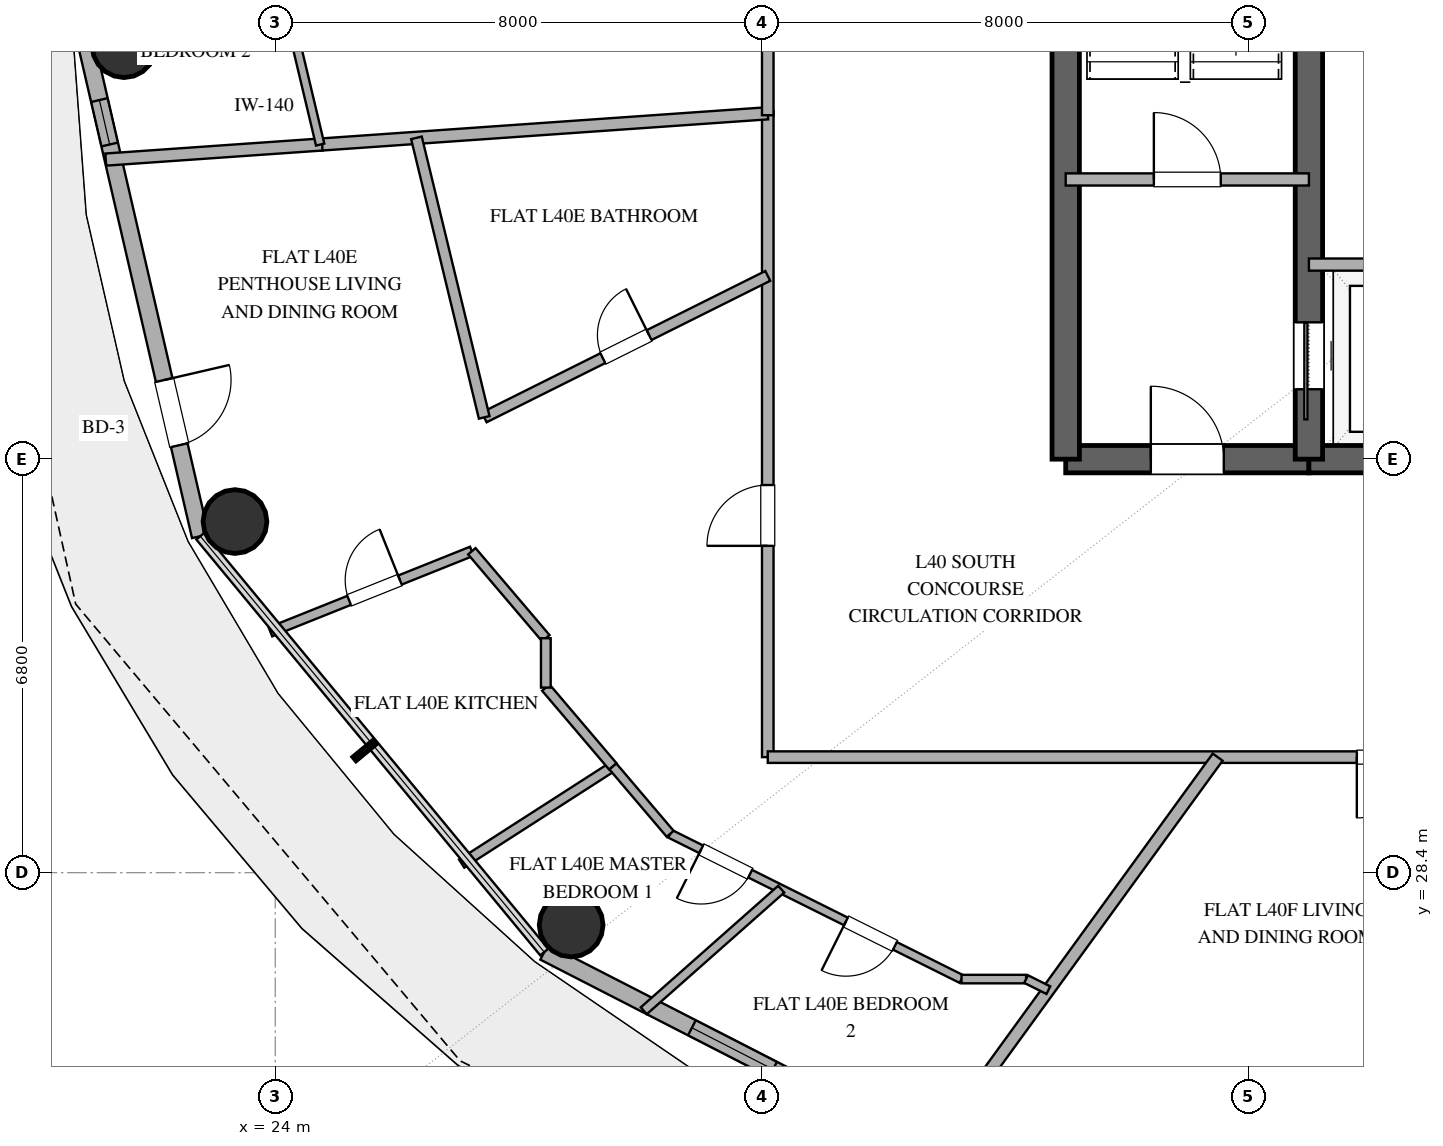
"""IFC4 building model, lengths in metres.
Left out: names, types, materials, properties, quantities, classifications, styles, units other than length and angle.
Written with IfcOpenShell. Run it as: python <this file> out.ifc"""

import sys

from ifc_helpers import new_model, si_unit, direction, frame, frame_2d, origin, origin_2d, place, context, subcontext, project, spatial, rectangle, hollow_circle, extrude, element, fill, save


model = new_model("IFC4")
c1 = context("Model", 3, precision=1e-05, world=origin(), true_north=direction((0.0, 1.0)))
c2 = subcontext(c1, "Body", "Model", "MODEL_VIEW")
j1 = project(units=[si_unit("LENGTHUNIT", "METRE"), si_unit("PLANEANGLEUNIT", "RADIAN")], contexts=[c1])
p1 = place(None, origin())
s1 = spatial("IfcSite", under=j1, at=p1, CompositionType="ELEMENT")
p2 = place(p1, origin())
s2 = spatial("IfcBuilding", under=s1, at=p2, CompositionType="ELEMENT")
p3 = place(p2, frame((0.0, 0.0, 161.4)))
s3 = spatial("IfcBuildingStorey", under=s2, at=p3, CompositionType="ELEMENT", Elevation=161.4)
p4 = place(p3, frame((37.0, 35.2, 0.0), z_axis=(0.0, 0.0, 1.0), x_axis=(1.0, 0.0, 0.0)))
e1 = element("IfcWall", 1, at=p4, inside=s3, PredefinedType="SHEAR", context=c2, shape_type="SweptSolid", body=[
    extrude(rectangle(XDim=4.0, YDim=0.45, at=frame_2d((2.0, 0.0))), origin(), (0.0, 0.0, 1.0), 3.38),
])
p5 = place(p4, frame((1.4, 0.0, 0.0)))
e2 = element("IfcOpeningElement", 2, at=p5, cuts=e1, PredefinedType="OPENING", context=c2, shape_type="SweptSolid", body=[
    extrude(rectangle(XDim=1.2, YDim=2.15, at=frame_2d((0.6, 1.075))), frame((0.0, 0.235, 0.0), z_axis=(0.0, -1.0, 0.0), x_axis=(1.0, 0.0, 0.0)), (0.0, 0.0, 1.0), 0.47),
])
p6 = place(p3, frame((41.0, 35.2, 0.0), z_axis=(0.0, 0.0, 1.0), x_axis=(1.0, 0.0, 0.0)))
e3 = element("IfcWall", 3, at=p6, inside=s3, PredefinedType="SHEAR", context=c2, shape_type="SweptSolid", body=[
    extrude(rectangle(XDim=14.0, YDim=0.45, at=frame_2d((7.0, 0.0))), origin(), (0.0, 0.0, 1.0), 3.38),
])
p7 = place(p6, frame((6.1, 0.0, 0.0)))
e4 = element("IfcOpeningElement", 4, at=p7, cuts=e3, PredefinedType="OPENING", context=c2, shape_type="SweptSolid", body=[
    extrude(rectangle(XDim=1.8, YDim=2.25, at=frame_2d((0.9, 1.125))), frame((0.0, 0.235, 0.0), z_axis=(0.0, -1.0, 0.0), x_axis=(1.0, 0.0, 0.0)), (0.0, 0.0, 1.0), 0.47),
])
p8 = place(p3, frame((37.0, 35.2, 0.0), z_axis=(0.0, 0.0, 1.0), x_axis=(0.0, 1.0, 0.0)))
e5 = element("IfcWall", 5, at=p8, inside=s3, PredefinedType="SHEAR", context=c2, shape_type="SweptSolid", body=[
    extrude(rectangle(XDim=13.6, YDim=0.45, at=frame_2d((6.8, 0.0))), origin(), (0.0, 0.0, 1.0), 3.38),
])
p9 = place(p3, frame((41.0, 35.2, 0.0), z_axis=(0.0, 0.0, 1.0), x_axis=(0.0, 1.0, 0.0)))
e6 = element("IfcWall", 6, at=p9, inside=s3, PredefinedType="SHEAR", context=c2, shape_type="SweptSolid", body=[
    extrude(rectangle(XDim=13.6, YDim=0.45, at=frame_2d((6.8, 0.0))), origin(), (0.0, 0.0, 1.0), 3.38),
])
p10 = place(p9, frame((1.15, 0.0, 0.0)))
e7 = element("IfcOpeningElement", 7, at=p10, cuts=e6, PredefinedType="OPENING", context=c2, shape_type="SweptSolid", body=[
    extrude(rectangle(XDim=1.1, YDim=2.2, at=frame_2d((0.55, 1.1))), frame((0.0, 0.235, 0.0), z_axis=(0.0, -1.0, 0.0), x_axis=(1.0, 0.0, 0.0)), (0.0, 0.0, 1.0), 0.47),
])
for number, where, z_axis, x_axis in (
    (8, (21.513, 42.0, 0.0), (0.0, 0.0, 1.0), (1.0, 0.0, 0.0)),
    (9, (23.338, 34.174, 0.0), (0.0, 0.0, 1.0), (1.0, 0.0, 0.0)),
    (10, (28.866, 27.54, 0.0), (0.0, 0.0, 1.0), (1.0, 0.0, 0.0)),
):
    element("IfcColumn", number, at=place(p3, frame(where, z_axis=z_axis, x_axis=x_axis)), inside=s3, PredefinedType="COLUMN", context=c2, shape_type="SweptSolid", body=[
        extrude(hollow_circle(Radius=0.525, WallThickness=0.028, at=origin_2d()), origin(), (0.0, 0.0, 1.0), 3.38),
    ])
p11 = place(p3, frame((20.901, 42.0, 0.0), z_axis=(0.0, 0.0, 1.0), x_axis=(0.225473184558, -0.974249374157, 0.0)))
e11 = element("IfcWall", 11, at=p11, inside=s3, PredefinedType="SOLIDWALL", context=c2, shape_type="SweptSolid", body=[
    extrude(rectangle(XDim=8.28, YDim=0.28, at=frame_2d((4.14, 0.0))), origin(), (0.0, 0.0, 1.0), 3.38),
])
p12 = place(p11, frame((5.644, 0.0, 0.0)))
e12 = element("IfcOpeningElement", 12, at=p12, cuts=e11, PredefinedType="OPENING", context=c2, shape_type="SweptSolid", body=[
    extrude(rectangle(XDim=1.1, YDim=2.25, at=frame_2d((0.55, 1.125))), frame((0.0, 0.15, 0.0), z_axis=(0.0, -1.0, 0.0), x_axis=(1.0, 0.0, 0.0)), (0.0, 0.0, 1.0), 0.3),
])
p13 = place(p11, frame((0.918, 0.0, 0.85)))
e13 = element("IfcOpeningElement", 13, at=p13, cuts=e11, PredefinedType="OPENING", context=c2, shape_type="SweptSolid", body=[
    extrude(rectangle(XDim=0.75, YDim=1.8, at=frame_2d((0.375, 0.9))), frame((0.0, 0.15, 0.0), z_axis=(0.0, -1.0, 0.0), x_axis=(1.0, 0.0, 0.0)), (0.0, 0.0, 1.0), 0.3),
])
p14 = place(p3, frame((28.424, 27.094, 0.0), z_axis=(0.0, 0.0, 1.0), x_axis=(0.889872523182, -0.456209263919, 0.0)))
e14 = element("IfcWall", 14, at=p14, inside=s3, PredefinedType="SOLIDWALL", context=c2, shape_type="SweptSolid", body=[
    extrude(rectangle(XDim=10.016, YDim=0.28, at=frame_2d((5.008, 0.0))), origin(), (0.0, 0.0, 1.0), 3.38),
])
p15 = place(p14, frame((2.729, 0.0, 0.85)))
e15 = element("IfcOpeningElement", 15, at=p15, cuts=e14, PredefinedType="OPENING", context=c2, shape_type="SweptSolid", body=[
    extrude(rectangle(XDim=1.5, YDim=2.0, at=frame_2d((0.75, 1.0))), frame((0.0, 0.15, 0.0), z_axis=(0.0, -1.0, 0.0), x_axis=(1.0, 0.0, 0.0)), (0.0, 0.0, 1.0), 0.3),
])
p16 = place(p14, frame((4.811, 0.0, 0.85)))
e16 = element("IfcOpeningElement", 16, at=p16, cuts=e14, PredefinedType="OPENING", context=c2, shape_type="SweptSolid", body=[
    extrude(rectangle(XDim=1.5, YDim=2.0, at=frame_2d((0.75, 1.0))), frame((0.0, 0.15, 0.0), z_axis=(0.0, -1.0, 0.0), x_axis=(1.0, 0.0, 0.0)), (0.0, 0.0, 1.0), 0.3),
])
p17 = place(p14, frame((7.479, 0.0, 0.85)))
e17 = element("IfcOpeningElement", 17, at=p17, cuts=e14, PredefinedType="OPENING", context=c2, shape_type="SweptSolid", body=[
    extrude(rectangle(XDim=1.0, YDim=1.8, at=frame_2d((0.5, 0.9))), frame((0.0, 0.15, 0.0), z_axis=(0.0, -1.0, 0.0), x_axis=(1.0, 0.0, 0.0)), (0.0, 0.0, 1.0), 0.3),
])
p18 = place(p3, frame((37.0, 39.8, 0.0), z_axis=(0.0, 0.0, 1.0), x_axis=(1.0, 0.0, 0.0)))
e18 = element("IfcWall", 18, at=p18, inside=s3, PredefinedType="SOLIDWALL", context=c2, shape_type="SweptSolid", body=[
    extrude(rectangle(XDim=4.0, YDim=0.2, at=frame_2d((2.0, 0.0))), origin(), (0.0, 0.0, 1.0), 2.74),
])
p19 = place(p18, frame((1.45, 0.0, 0.0)))
e19 = element("IfcOpeningElement", 19, at=p19, cuts=e18, PredefinedType="OPENING", context=c2, shape_type="SweptSolid", body=[
    extrude(rectangle(XDim=1.1, YDim=2.15, at=frame_2d((0.55, 1.075))), frame((0.0, 0.11, 0.0), z_axis=(0.0, -1.0, 0.0), x_axis=(1.0, 0.0, 0.0)), (0.0, 0.0, 1.0), 0.22),
])
p20 = place(p3, frame((41.0, 38.4, 0.0), z_axis=(0.0, 0.0, 1.0), x_axis=(1.0, 0.0, 0.0)))
e20 = element("IfcWall", 20, at=p20, inside=s3, PredefinedType="SOLIDWALL", context=c2, shape_type="SweptSolid", body=[
    extrude(rectangle(XDim=2.95, YDim=0.2, at=frame_2d((1.475, 0.0))), origin(), (0.0, 0.0, 1.0), 2.74),
])
p21 = place(p3, frame((32.1, 30.3, 0.0), z_axis=(0.0, 0.0, 1.0), x_axis=(0.0, 1.0, 0.0)))
e21 = element("IfcWall", 21, at=p21, inside=s3, PredefinedType="PARTITIONING", context=c2, shape_type="SweptSolid", body=[
    extrude(rectangle(XDim=10.62, YDim=0.19, at=frame_2d((5.31, 0.0))), origin(), (0.0, 0.0, 1.0), 2.74),
])
p22 = place(p21, frame((3.475, 0.0, 0.0)))
e22 = element("IfcOpeningElement", 22, at=p22, cuts=e21, PredefinedType="OPENING", context=c2, shape_type="SweptSolid", body=[
    extrude(rectangle(XDim=1.0, YDim=2.2, at=frame_2d((0.5, 1.1))), frame((0.0, 0.105, 0.0), z_axis=(0.0, -1.0, 0.0), x_axis=(1.0, 0.0, 0.0)), (0.0, 0.0, 1.0), 0.21),
])
p23 = place(p3, frame((48.308, 30.3, 0.0), z_axis=(0.0, 0.0, 1.0), x_axis=(-1.0, 0.0, 0.0)))
e23 = element("IfcWall", 23, at=p23, inside=s3, PredefinedType="PARTITIONING", context=c2, shape_type="SweptSolid", body=[
    extrude(rectangle(XDim=16.208, YDim=0.19, at=frame_2d((8.104, 0.0))), origin(), (0.0, 0.0, 1.0), 2.74),
])
p24 = place(p23, frame((5.52, 0.0, 0.0)))
e24 = element("IfcOpeningElement", 24, at=p24, cuts=e23, PredefinedType="OPENING", context=c2, shape_type="SweptSolid", body=[
    extrude(rectangle(XDim=1.0, YDim=2.2, at=frame_2d((0.5, 1.1))), frame((0.0, 0.105, 0.0), z_axis=(0.0, -1.0, 0.0), x_axis=(1.0, 0.0, 0.0)), (0.0, 0.0, 1.0), 0.21),
])
p25 = place(p3, frame((32.1, 40.888, 0.0), z_axis=(0.0, 0.0, 1.0), x_axis=(-0.997562906323, -0.069772830877, 0.0)))
e25 = element("IfcWall", 25, at=p25, inside=s3, PredefinedType="PARTITIONING", context=c2, shape_type="SweptSolid", body=[
    extrude(rectangle(XDim=7.38, YDim=0.2, at=frame_2d((3.69, 0.0))), origin(), (0.0, 0.0, 1.0), 2.74),
])
p26 = place(p3, frame((32.1, 40.856, 0.0), z_axis=(0.0, 0.0, 1.0), x_axis=(0.0, 1.0, 0.0)))
e26 = element("IfcWall", 26, at=p26, inside=s3, PredefinedType="PARTITIONING", context=c2, shape_type="SweptSolid", body=[
    extrude(rectangle(XDim=12.844, YDim=0.19, at=frame_2d((6.422, 0.0))), origin(), (0.0, 0.0, 1.0), 2.74),
])
p27 = place(p3, frame((27.436, 35.887, 0.0), z_axis=(0.0, 0.0, 1.0), x_axis=(0.894857716432, 0.446351506485, 0.0)))
e27 = element("IfcWall", 27, at=p27, inside=s3, PredefinedType="PLUMBINGWALL", context=c2, shape_type="SweptSolid", body=[
    extrude(rectangle(XDim=5.212, YDim=0.18, at=frame_2d((2.606, 0.0))), origin(), (0.0, 0.0, 1.0), 2.74),
])
p28 = place(p27, frame((2.181, 0.0, 0.0)))
e28 = element("IfcOpeningElement", 28, at=p28, cuts=e27, PredefinedType="OPENING", context=c2, shape_type="SweptSolid", body=[
    extrude(rectangle(XDim=0.85, YDim=2.1, at=frame_2d((0.425, 1.05))), frame((0.0, 0.1, 0.0), z_axis=(0.0, -1.0, 0.0), x_axis=(1.0, 0.0, 0.0)), (0.0, 0.0, 1.0), 0.2),
])
p29 = place(p3, frame((34.726, 23.73, 0.0), z_axis=(0.0, 0.0, 1.0), x_axis=(0.587785528328, 0.809016793823, 0.0)))
e29 = element("IfcWall", 29, at=p29, inside=s3, PredefinedType="PARTITIONING", context=c2, shape_type="SweptSolid", body=[
    extrude(rectangle(XDim=8.121, YDim=0.2, at=frame_2d((4.061, 0.0))), origin(), (0.0, 0.0, 1.0), 2.74),
])
p30 = place(p3, frame((26.322, 40.484, 0.0), z_axis=(0.0, 0.0, 1.0), x_axis=(0.235484788327, -0.971878034769, 0.0)))
e30 = element("IfcWall", 30, at=p30, inside=s3, PredefinedType="PLUMBINGWALL", context=c2, shape_type="SweptSolid", body=[
    extrude(rectangle(XDim=4.73, YDim=0.18, at=frame_2d((2.365, 0.0))), origin(), (0.0, 0.0, 1.0), 2.74),
])
p31 = place(p3, frame((23.921, 32.36, 0.0), z_axis=(0.0, 0.0, 1.0), x_axis=(0.928353942887, 0.371697399408, 0.0)))
e31 = element("IfcWall", 31, at=p31, inside=s3, PredefinedType="PLUMBINGWALL", context=c2, shape_type="SweptSolid", body=[
    extrude(rectangle(XDim=3.568, YDim=0.16, at=frame_2d((1.784, 0.0))), origin(), (0.0, 0.0, 1.0), 2.74),
])
p32 = place(p31, frame((1.394, 0.0, 0.0)))
e32 = element("IfcOpeningElement", 32, at=p32, cuts=e31, PredefinedType="OPENING", context=c2, shape_type="SweptSolid", body=[
    extrude(rectangle(XDim=0.9, YDim=2.1, at=frame_2d((0.45, 1.05))), frame((0.0, 0.09, 0.0), z_axis=(0.0, -1.0, 0.0), x_axis=(1.0, 0.0, 0.0)), (0.0, 0.0, 1.0), 0.18),
])
p33 = place(p3, frame((21.212, 40.127, 0.0), z_axis=(0.0, 0.0, 1.0), x_axis=(0.997565256009, 0.069739228586, 0.0)))
e33 = element("IfcWall", 33, at=p33, inside=s3, PredefinedType="PARTITIONING", context=c2, shape_type="SweptSolid", body=[
    extrude(rectangle(XDim=3.567, YDim=0.2, at=frame_2d((1.784, 0.0))), origin(), (0.0, 0.0, 1.0), 2.74),
])
p34 = place(p3, frame((35.287, 26.65, 0.0), z_axis=(0.0, 0.0, 1.0), x_axis=(-0.894937323042, 0.44619187333, 0.0)))
e34 = element("IfcWall", 34, at=p34, inside=s3, PredefinedType="PARTITIONING", context=c2, shape_type="SweptSolid", body=[
    extrude(rectangle(XDim=5.354, YDim=0.14, at=frame_2d((2.677, 0.0))), origin(), (0.0, 0.0, 1.0), 2.74),
])
p35 = place(p34, frame((1.224, 0.0, 0.0)))
e35 = element("IfcOpeningElement", 35, at=p35, cuts=e34, PredefinedType="OPENING", context=c2, shape_type="SweptSolid", body=[
    extrude(rectangle(XDim=0.9, YDim=2.1, at=frame_2d((0.45, 1.05))), frame((0.0, 0.08, 0.0), z_axis=(0.0, -1.0, 0.0), x_axis=(1.0, 0.0, 0.0)), (0.0, 0.0, 1.0), 0.16),
])
p36 = place(p34, frame((3.884, 0.0, 0.0)))
e36 = element("IfcOpeningElement", 36, at=p36, cuts=e34, PredefinedType="OPENING", context=c2, shape_type="SweptSolid", body=[
    extrude(rectangle(XDim=0.9, YDim=2.1, at=frame_2d((0.45, 1.05))), frame((0.0, 0.08, 0.0), z_axis=(0.0, -1.0, 0.0), x_axis=(1.0, 0.0, 0.0)), (0.0, 0.0, 1.0), 0.16),
])
p37 = place(p3, frame((32.321, 28.128, 0.0), z_axis=(0.0, 0.0, 1.0), x_axis=(-0.748956405403, -0.6626192744, 0.0)))
e37 = element("IfcWall", 37, at=p37, inside=s3, PredefinedType="PARTITIONING", context=c2, shape_type="SweptSolid", body=[
    extrude(rectangle(XDim=3.017, YDim=0.15, at=frame_2d((1.509, 0.0))), origin(), (0.0, 0.0, 1.0), 2.74),
])
p38 = place(p3, frame((29.553, 30.146, 0.0), z_axis=(0.0, 0.0, 1.0), x_axis=(-0.841296531109, -0.540573904978, 0.0)))
e38 = element("IfcWall", 38, at=p38, inside=s3, PredefinedType="PLUMBINGWALL", context=c2, shape_type="SweptSolid", body=[
    extrude(rectangle(XDim=2.956, YDim=0.16, at=frame_2d((1.478, 0.0))), origin(), (0.0, 0.0, 1.0), 2.74),
])
p39 = place(p3, frame((27.233, 33.686, 0.0), z_axis=(0.0, 0.0, 1.0), x_axis=(0.648078524475, -0.761573519835, 0.0)))
e39 = element("IfcWall", 39, at=p39, inside=s3, PredefinedType="PLUMBINGWALL", context=c2, shape_type="SweptSolid", body=[
    extrude(rectangle(XDim=1.878, YDim=0.16, at=frame_2d((0.939, 0.0))), origin(), (0.0, 0.0, 1.0), 2.74),
])
p40 = place(p3, frame((28.45, 31.443, 0.0), z_axis=(0.0, 0.0, 1.0), x_axis=(0.64788149294, -0.761741144422, 0.0)))
e40 = element("IfcWall", 40, at=p40, inside=s3, PredefinedType="PLUMBINGWALL", context=c2, shape_type="SweptSolid", body=[
    extrude(rectangle(XDim=1.702, YDim=0.16, at=frame_2d((0.851, 0.0))), origin(), (0.0, 0.0, 1.0), 2.74),
])
p41 = place(p3, frame((24.739, 40.373, 0.0), z_axis=(0.0, 0.0, 1.0), x_axis=(-0.231561310927, 0.972820311919, 0.0)))
e41 = element("IfcWall", 41, at=p41, inside=s3, PredefinedType="PARTITIONING", context=c2, shape_type="SweptSolid", body=[
    extrude(rectangle(XDim=1.672, YDim=0.14, at=frame_2d((0.836, 0.0))), origin(), (0.0, 0.0, 1.0), 2.74),
])
p42 = place(p3, frame((29.553, 30.146, 0.0), z_axis=(0.0, 0.0, 1.0), x_axis=(0.647896934681, -0.761728010533, 0.0)))
e42 = element("IfcWall", 42, at=p42, inside=s3, PredefinedType="PARTITIONING", context=c2, shape_type="SweptSolid", body=[
    extrude(rectangle(XDim=1.454, YDim=0.15, at=frame_2d((0.727, 0.0))), origin(), (0.0, 0.0, 1.0), 2.74),
])
p43 = place(p3, frame((36.349, 26.65, 0.0), z_axis=(0.0, 0.0, 1.0), x_axis=(-1.0, 0.0, 0.0)))
e43 = element("IfcWall", 43, at=p43, inside=s3, PredefinedType="PARTITIONING", context=c2, shape_type="SweptSolid", body=[
    extrude(rectangle(XDim=1.062, YDim=0.14, at=frame_2d((0.531, 0.0))), origin(), (0.0, 0.0, 1.0), 2.74),
])
p44 = place(p3, frame((28.45, 32.256, 0.0), z_axis=(0.0, 0.0, 1.0), x_axis=(0.0, -1.0, 0.0)))
e44 = element("IfcWall", 44, at=p44, inside=s3, PredefinedType="PLUMBINGWALL", context=c2, shape_type="SweptSolid", body=[
    extrude(rectangle(XDim=0.812, YDim=0.16, at=frame_2d((0.406, 0.0))), origin(), (0.0, 0.0, 1.0), 2.74),
])
p45 = place(p3, frame((36.715, 26.468, 0.0), z_axis=(0.0, 0.0, 1.0), x_axis=(-0.895142158028, 0.445780794698, 0.0)))
e45 = element("IfcWall", 45, at=p45, inside=s3, PredefinedType="PARTITIONING", context=c2, shape_type="SweptSolid", body=[
    extrude(rectangle(XDim=0.409, YDim=0.14, at=frame_2d((0.205, 0.0))), origin(), (0.0, 0.0, 1.0), 2.74),
])
p46 = place(p12, origin())
e46 = element("IfcDoor", 46, at=p46, inside=s3, OperationType="SINGLE_SWING_LEFT", PredefinedType="DOOR", context=c2, shape_type="SweptSolid", body=[
    extrude(rectangle(XDim=1.1, YDim=2.25, at=frame_2d((0.55, 1.125))), frame((0.0, 0.025, 0.0), z_axis=(0.0, -1.0, 0.0), x_axis=(1.0, 0.0, 0.0)), (0.0, 0.0, 1.0), 0.05),
])
fill(e12, e46)
p47 = place(p15, origin())
e47 = element("IfcWindow", 47, at=p47, inside=s3, PartitioningType="SINGLE_PANEL", PredefinedType="WINDOW", context=c2, shape_type="SweptSolid", body=[
    extrude(rectangle(XDim=1.5, YDim=2.0, at=frame_2d((0.75, 1.0))), frame((0.0, 0.03, 0.0), z_axis=(0.0, -1.0, 0.0), x_axis=(1.0, 0.0, 0.0)), (0.0, 0.0, 1.0), 0.06),
])
fill(e15, e47)
p48 = place(p13, origin())
e48 = element("IfcWindow", 48, at=p48, inside=s3, PartitioningType="SINGLE_PANEL", PredefinedType="WINDOW", context=c2, shape_type="SweptSolid", body=[
    extrude(rectangle(XDim=0.75, YDim=1.8, at=frame_2d((0.375, 0.9))), frame((0.0, 0.03, 0.0), z_axis=(0.0, -1.0, 0.0), x_axis=(1.0, 0.0, 0.0)), (0.0, 0.0, 1.0), 0.06),
])
fill(e13, e48)
p49 = place(p10, origin())
e49 = element("IfcDoor", 49, at=p49, inside=s3, OperationType="SLIDING_TO_LEFT", PredefinedType="DOOR", context=c2, shape_type="SweptSolid", body=[
    extrude(rectangle(XDim=1.1, YDim=2.2, at=frame_2d((0.55, 1.1))), frame((0.0, 0.025, 0.0), z_axis=(0.0, -1.0, 0.0), x_axis=(1.0, 0.0, 0.0)), (0.0, 0.0, 1.0), 0.05),
])
fill(e7, e49)
p50 = place(p5, origin())
e50 = element("IfcDoor", 50, at=p50, inside=s3, OperationType="SINGLE_SWING_LEFT", PredefinedType="DOOR", context=c2, shape_type="SweptSolid", body=[
    extrude(rectangle(XDim=1.2, YDim=2.15, at=frame_2d((0.6, 1.075))), frame((0.0, 0.025, 0.0), z_axis=(0.0, -1.0, 0.0), x_axis=(1.0, 0.0, 0.0)), (0.0, 0.0, 1.0), 0.05),
])
fill(e2, e50)
p51 = place(p19, origin())
e51 = element("IfcDoor", 51, at=p51, inside=s3, OperationType="SINGLE_SWING_LEFT", PredefinedType="DOOR", context=c2, shape_type="SweptSolid", body=[
    extrude(rectangle(XDim=1.1, YDim=2.15, at=frame_2d((0.55, 1.075))), frame((0.0, 0.025, 0.0), z_axis=(0.0, -1.0, 0.0), x_axis=(1.0, 0.0, 0.0)), (0.0, 0.0, 1.0), 0.05),
])
fill(e19, e51)
p52 = place(p22, origin())
e52 = element("IfcDoor", 52, at=p52, inside=s3, OperationType="SINGLE_SWING_LEFT", PredefinedType="DOOR", context=c2, shape_type="SweptSolid", body=[
    extrude(rectangle(XDim=1.0, YDim=2.2, at=frame_2d((0.5, 1.1))), frame((0.0, 0.025, 0.0), z_axis=(0.0, -1.0, 0.0), x_axis=(1.0, 0.0, 0.0)), (0.0, 0.0, 1.0), 0.05),
])
fill(e22, e52)
p53 = place(p24, origin())
e53 = element("IfcDoor", 53, at=p53, inside=s3, OperationType="SINGLE_SWING_RIGHT", PredefinedType="DOOR", context=c2, shape_type="SweptSolid", body=[
    extrude(rectangle(XDim=1.0, YDim=2.2, at=frame_2d((0.5, 1.1))), frame((0.0, 0.025, 0.0), z_axis=(0.0, -1.0, 0.0), x_axis=(1.0, 0.0, 0.0)), (0.0, 0.0, 1.0), 0.05),
])
fill(e24, e53)
p54 = place(p28, origin())
e54 = element("IfcDoor", 54, at=p54, inside=s3, OperationType="SINGLE_SWING_RIGHT", PredefinedType="DOOR", context=c2, shape_type="SweptSolid", body=[
    extrude(rectangle(XDim=0.85, YDim=2.1, at=frame_2d((0.425, 1.05))), frame((0.0, 0.025, 0.0), z_axis=(0.0, -1.0, 0.0), x_axis=(1.0, 0.0, 0.0)), (0.0, 0.0, 1.0), 0.05),
])
fill(e28, e54)
p55 = place(p32, origin())
e55 = element("IfcDoor", 55, at=p55, inside=s3, OperationType="SINGLE_SWING_RIGHT", PredefinedType="DOOR", context=c2, shape_type="SweptSolid", body=[
    extrude(rectangle(XDim=0.9, YDim=2.1, at=frame_2d((0.45, 1.05))), frame((0.0, 0.025, 0.0), z_axis=(0.0, -1.0, 0.0), x_axis=(1.0, 0.0, 0.0)), (0.0, 0.0, 1.0), 0.05),
])
fill(e32, e55)
p56 = place(p35, origin())
e56 = element("IfcDoor", 56, at=p56, inside=s3, OperationType="SINGLE_SWING_RIGHT", PredefinedType="DOOR", context=c2, shape_type="SweptSolid", body=[
    extrude(rectangle(XDim=0.9, YDim=2.1, at=frame_2d((0.45, 1.05))), frame((0.0, 0.025, 0.0), z_axis=(0.0, -1.0, 0.0), x_axis=(1.0, 0.0, 0.0)), (0.0, 0.0, 1.0), 0.05),
])
fill(e35, e56)
p57 = place(p36, origin())
e57 = element("IfcDoor", 57, at=p57, inside=s3, OperationType="SINGLE_SWING_RIGHT", PredefinedType="DOOR", context=c2, shape_type="SweptSolid", body=[
    extrude(rectangle(XDim=0.9, YDim=2.1, at=frame_2d((0.45, 1.05))), frame((0.0, 0.025, 0.0), z_axis=(0.0, -1.0, 0.0), x_axis=(1.0, 0.0, 0.0)), (0.0, 0.0, 1.0), 0.05),
])
fill(e36, e57)
save(model, sys.argv[1])
